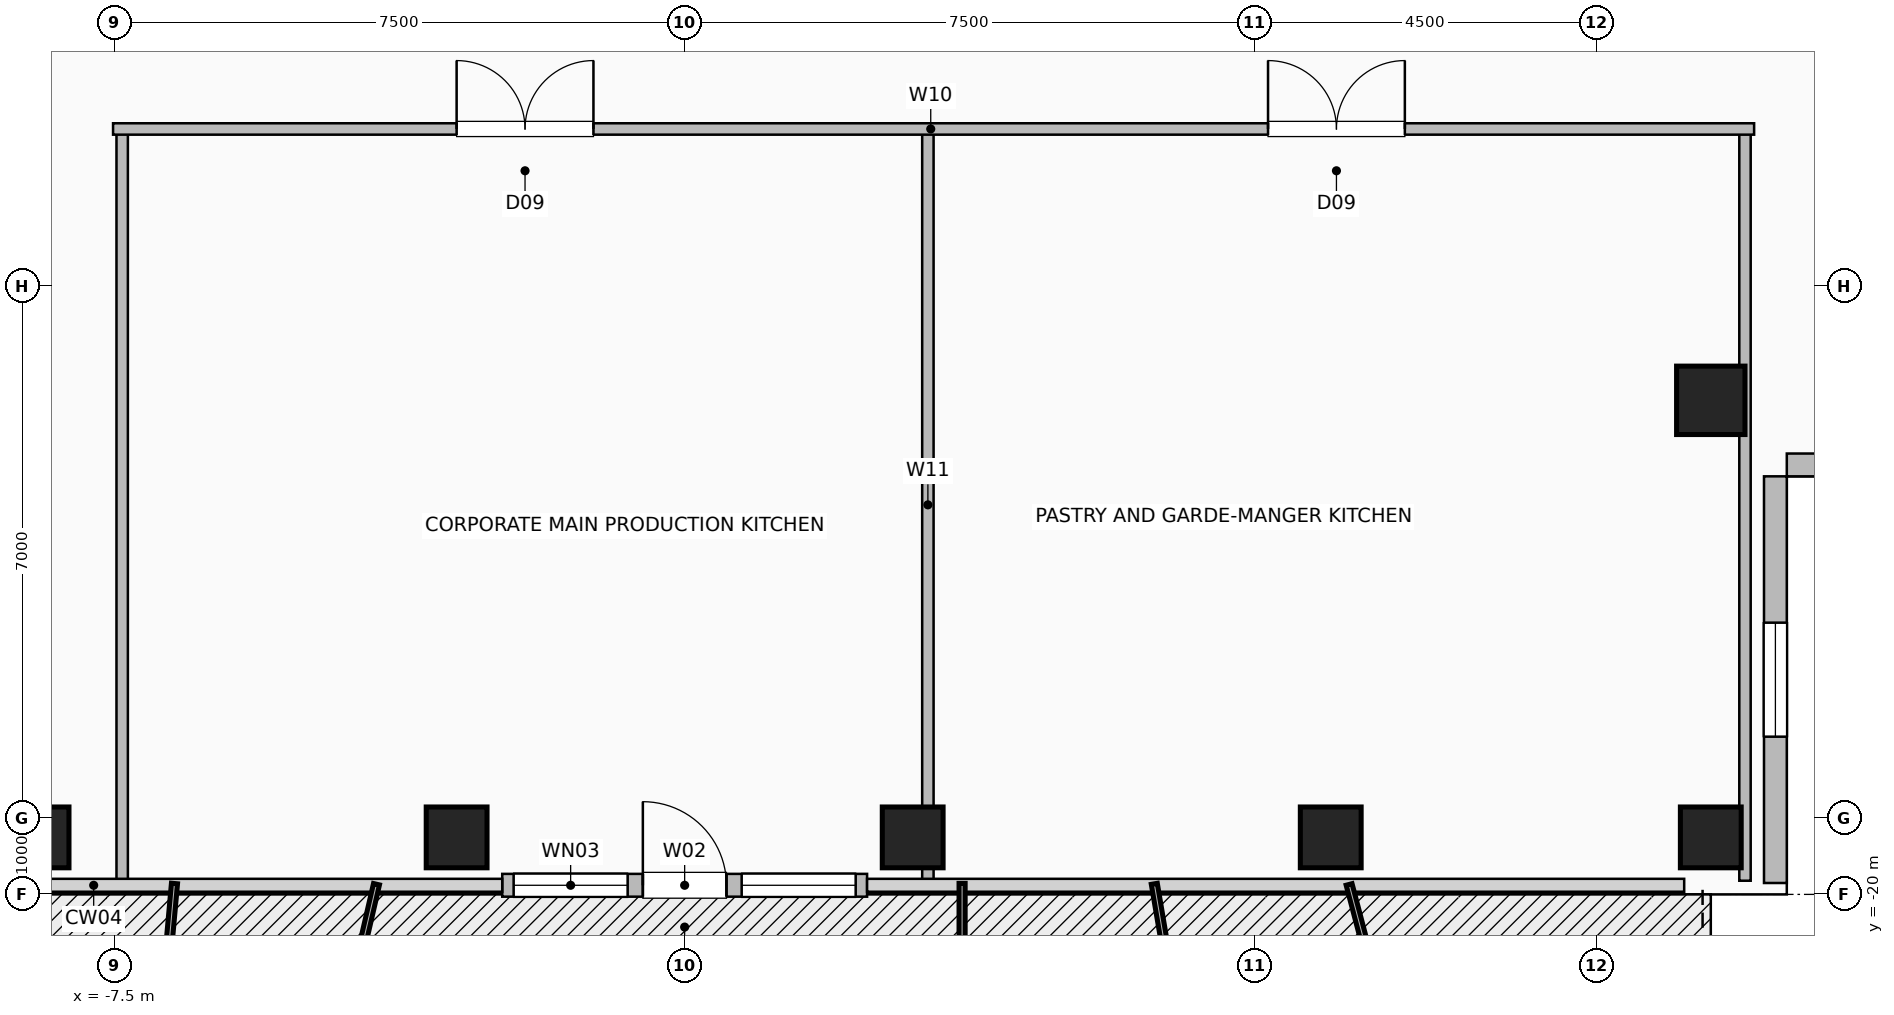
"""IFC4 building model, lengths in metres.
Left out: names, types, materials, properties, quantities, classifications, styles, units other than length and angle.
Written with IfcOpenShell. Run it as: python <this file> out.ifc"""

import sys

from ifc_helpers import new_model, si_unit, direction, frame, frame_2d, origin, origin_2d, place, context, subcontext, project, spatial, rectangle, hollow_rectangle, extrude, element, fill, save


model = new_model("IFC4")
c1 = context("Model", 3, precision=1e-05, world=origin(), true_north=direction((0.0, 1.0)))
c2 = subcontext(c1, "Body", "Model", "MODEL_VIEW")
j1 = project(units=[si_unit("LENGTHUNIT", "METRE"), si_unit("PLANEANGLEUNIT", "RADIAN")], contexts=[c1])
p1 = place(None, origin())
s1 = spatial("IfcSite", under=j1, at=p1, CompositionType="ELEMENT")
p2 = place(p1, origin())
s2 = spatial("IfcBuilding", under=s1, at=p2, CompositionType="ELEMENT")
p3 = place(p2, frame((0.0, 0.0, 195.0)))
s3 = spatial("IfcBuildingStorey", under=s2, at=p3, CompositionType="ELEMENT", Elevation=195.0)
for number, where, z_axis, x_axis in (
    (1, (-8.5, -19.25, 0.0), (0.0, 0.0, 1.0), (1.0, 0.0, 0.0)),
    (2, (-3.0, -19.25, 0.0), (0.0, 0.0, 1.0), (1.0, 0.0, 0.0)),
    (3, (3.0, -19.25, 0.0), (0.0, 0.0, 1.0), (1.0, 0.0, 0.0)),
    (4, (8.5, -19.25, 0.0), (0.0, 0.0, 1.0), (1.0, 0.0, 0.0)),
    (5, (13.5, -19.25, 0.0), (0.0, 0.0, 1.0), (1.0, 0.0, 0.0)),
):
    element("IfcColumn", number, at=place(p3, frame(where, z_axis=z_axis, x_axis=x_axis)), inside=s3, PredefinedType="COLUMN", context=c2, shape_type="SweptSolid", body=[
        extrude(hollow_rectangle(XDim=0.8, YDim=0.8, WallThickness=0.04, at=origin_2d()), origin(), (0.0, 0.0, 1.0), 3.6),
    ])
p4 = place(p3, frame((13.5, -13.5, 0.0), z_axis=(0.0, 0.0, 1.0), x_axis=(1.0, 0.0, 0.0)))
e6 = element("IfcColumn", 6, at=p4, inside=s3, PredefinedType="COLUMN", context=c2, shape_type="SweptSolid", body=[
    extrude(hollow_rectangle(XDim=0.9, YDim=0.9, WallThickness=0.045, at=origin_2d()), origin(), (0.0, 0.0, 1.0), 3.6),
])
p5 = place(p3, frame((-2.4, -19.88, 0.0), z_axis=(0.0, 0.0, 1.0), x_axis=(1.0, 0.0, 0.0)))
e7 = element("IfcWall", 7, at=p5, inside=s3, PredefinedType="SOLIDWALL", context=c2, shape_type="SweptSolid", body=[
    extrude(rectangle(XDim=4.8, YDim=0.3, at=frame_2d((2.4, 0.0))), origin(), (0.0, 0.0, 1.0), 3.36),
])
p6 = place(p5, frame((1.85, 0.0, 0.0)))
e8 = element("IfcOpeningElement", 8, at=p6, cuts=e7, PredefinedType="OPENING", context=c2, shape_type="SweptSolid", body=[
    extrude(rectangle(XDim=1.1, YDim=2.2, at=frame_2d((0.55, 1.1))), frame((0.0, 0.16, 0.0), z_axis=(0.0, -1.0, 0.0), x_axis=(1.0, 0.0, 0.0)), (0.0, 0.0, 1.0), 0.32),
])
p7 = place(p5, frame((0.15, 0.0, 0.85)))
e9 = element("IfcOpeningElement", 9, at=p7, cuts=e7, PredefinedType="OPENING", context=c2, shape_type="SweptSolid", body=[
    extrude(rectangle(XDim=1.5, YDim=1.8, at=frame_2d((0.75, 0.9))), frame((0.0, 0.16, 0.0), z_axis=(0.0, -1.0, 0.0), x_axis=(1.0, 0.0, 0.0)), (0.0, 0.0, 1.0), 0.32),
])
p8 = place(p5, frame((3.15, 0.0, 0.85)))
e10 = element("IfcOpeningElement", 10, at=p8, cuts=e7, PredefinedType="OPENING", context=c2, shape_type="SweptSolid", body=[
    extrude(rectangle(XDim=1.5, YDim=1.8, at=frame_2d((0.75, 0.9))), frame((0.0, 0.16, 0.0), z_axis=(0.0, -1.0, 0.0), x_axis=(1.0, 0.0, 0.0)), (0.0, 0.0, 1.0), 0.32),
])
p9 = place(p3, frame((14.35, -19.85, 0.0), z_axis=(0.0, 0.0, 1.0), x_axis=(0.0, 1.0, 0.0)))
e11 = element("IfcWall", 11, at=p9, inside=s3, PredefinedType="SOLIDWALL", context=c2, shape_type="SweptSolid", body=[
    extrude(rectangle(XDim=5.35, YDim=0.3, at=frame_2d((2.675, 0.0))), origin(), (0.0, 0.0, 1.0), 3.36),
])
p10 = place(p9, frame((1.925, 0.0, 0.9)))
e12 = element("IfcOpeningElement", 12, at=p10, cuts=e11, PredefinedType="OPENING", context=c2, shape_type="SweptSolid", body=[
    extrude(rectangle(XDim=1.5, YDim=1.8, at=frame_2d((0.75, 0.9))), frame((0.0, 0.16, 0.0), z_axis=(0.0, -1.0, 0.0), x_axis=(1.0, 0.0, 0.0)), (0.0, 0.0, 1.0), 0.32),
])
p11 = place(p3, frame((19.85, -14.35, 0.0), z_axis=(0.0, 0.0, 1.0), x_axis=(-1.0, 0.0, 0.0)))
e13 = element("IfcWall", 13, at=p11, inside=s3, PredefinedType="SOLIDWALL", context=c2, shape_type="SweptSolid", body=[
    extrude(rectangle(XDim=5.35, YDim=0.3, at=frame_2d((2.675, 0.0))), origin(), (0.0, 0.0, 1.0), 3.36),
])
for number, where, z_axis, x_axis in (
    (14, (-7.4, -19.82, 0.0), (0.0, 0.0, 1.0), (0.0, 1.0, 0.0)),
    (15, (3.2, -19.82, 0.0), (0.0, 0.0, 1.0), (0.0, 1.0, 0.0)),
    (16, (13.95, -19.82, 0.0), (0.0, 0.0, 1.0), (0.0, 1.0, 0.0)),
):
    element("IfcWall", number, at=place(p3, frame(where, z_axis=z_axis, x_axis=x_axis)), inside=s3, PredefinedType="PARTITIONING", context=c2, shape_type="SweptSolid", body=[
        extrude(rectangle(XDim=9.89, YDim=0.15, at=frame_2d((4.945, 0.0))), origin(), (0.0, 0.0, 1.0), 3.36),
    ])
p12 = place(p3, frame((-7.52, -9.93, 0.0), z_axis=(0.0, 0.0, 1.0), x_axis=(1.0, 0.0, 0.0)))
e17 = element("IfcWall", 17, at=p12, inside=s3, PredefinedType="PARTITIONING", context=c2, shape_type="SweptSolid", body=[
    extrude(rectangle(XDim=21.59, YDim=0.15, at=frame_2d((10.795, 0.0))), origin(), (0.0, 0.0, 1.0), 3.36),
])
p13 = place(p12, frame((4.52, 0.0, 0.0)))
e18 = element("IfcOpeningElement", 18, at=p13, cuts=e17, PredefinedType="OPENING", context=c2, shape_type="SweptSolid", body=[
    extrude(rectangle(XDim=1.8, YDim=2.08, at=frame_2d((0.9, 1.04))), frame((0.0, 0.085, 0.0), z_axis=(0.0, -1.0, 0.0), x_axis=(1.0, 0.0, 0.0)), (0.0, 0.0, 1.0), 0.17),
])
p14 = place(p12, frame((15.195, 0.0, 0.0)))
e19 = element("IfcOpeningElement", 19, at=p14, cuts=e17, PredefinedType="OPENING", context=c2, shape_type="SweptSolid", body=[
    extrude(rectangle(XDim=1.8, YDim=2.08, at=frame_2d((0.9, 1.04))), frame((0.0, 0.085, 0.0), z_axis=(0.0, -1.0, 0.0), x_axis=(1.0, 0.0, 0.0)), (0.0, 0.0, 1.0), 0.17),
])
p15 = place(p6, origin())
e20 = element("IfcDoor", 20, at=p15, inside=s3, OperationType="SINGLE_SWING_LEFT", PredefinedType="DOOR", context=c2, shape_type="SweptSolid", body=[
    extrude(rectangle(XDim=1.1, YDim=2.2, at=frame_2d((0.55, 1.1))), frame((0.0, 0.025, 0.0), z_axis=(0.0, -1.0, 0.0), x_axis=(1.0, 0.0, 0.0)), (0.0, 0.0, 1.0), 0.05),
])
fill(e8, e20)
p16 = place(p7, origin())
e21 = element("IfcWindow", 21, at=p16, inside=s3, PartitioningType="SINGLE_PANEL", PredefinedType="WINDOW", context=c2, shape_type="SweptSolid", body=[
    extrude(rectangle(XDim=1.5, YDim=1.8, at=frame_2d((0.75, 0.9))), frame((0.0, 0.03, 0.0), z_axis=(0.0, -1.0, 0.0), x_axis=(1.0, 0.0, 0.0)), (0.0, 0.0, 1.0), 0.06),
])
fill(e9, e21)
p17 = place(p8, origin())
e22 = element("IfcWindow", 22, at=p17, inside=s3, PartitioningType="SINGLE_PANEL", PredefinedType="WINDOW", context=c2, shape_type="SweptSolid", body=[
    extrude(rectangle(XDim=1.5, YDim=1.8, at=frame_2d((0.75, 0.9))), frame((0.0, 0.03, 0.0), z_axis=(0.0, -1.0, 0.0), x_axis=(1.0, 0.0, 0.0)), (0.0, 0.0, 1.0), 0.06),
])
fill(e10, e22)
p18 = place(p10, origin())
e23 = element("IfcWindow", 23, at=p18, inside=s3, PartitioningType="SINGLE_PANEL", PredefinedType="WINDOW", context=c2, shape_type="SweptSolid", body=[
    extrude(rectangle(XDim=1.5, YDim=1.8, at=frame_2d((0.75, 0.9))), frame((0.0, 0.03, 0.0), z_axis=(0.0, -1.0, 0.0), x_axis=(1.0, 0.0, 0.0)), (0.0, 0.0, 1.0), 0.06),
])
fill(e12, e23)
p19 = place(p13, origin())
e24 = element("IfcDoor", 24, at=p19, inside=s3, OperationType="DOUBLE_DOOR_SINGLE_SWING", PredefinedType="DOOR", context=c2, shape_type="SweptSolid", body=[
    extrude(rectangle(XDim=1.8, YDim=2.08, at=frame_2d((0.9, 1.04))), frame((0.0, 0.025, 0.0), z_axis=(0.0, -1.0, 0.0), x_axis=(1.0, 0.0, 0.0)), (0.0, 0.0, 1.0), 0.05),
])
fill(e18, e24)
p20 = place(p14, origin())
e25 = element("IfcDoor", 25, at=p20, inside=s3, OperationType="DOUBLE_DOOR_SINGLE_SWING", PredefinedType="DOOR", context=c2, shape_type="SweptSolid", body=[
    extrude(rectangle(XDim=1.8, YDim=2.08, at=frame_2d((0.9, 1.04))), frame((0.0, 0.025, 0.0), z_axis=(0.0, -1.0, 0.0), x_axis=(1.0, 0.0, 0.0)), (0.0, 0.0, 1.0), 0.05),
])
fill(e19, e25)
save(model, sys.argv[1])
